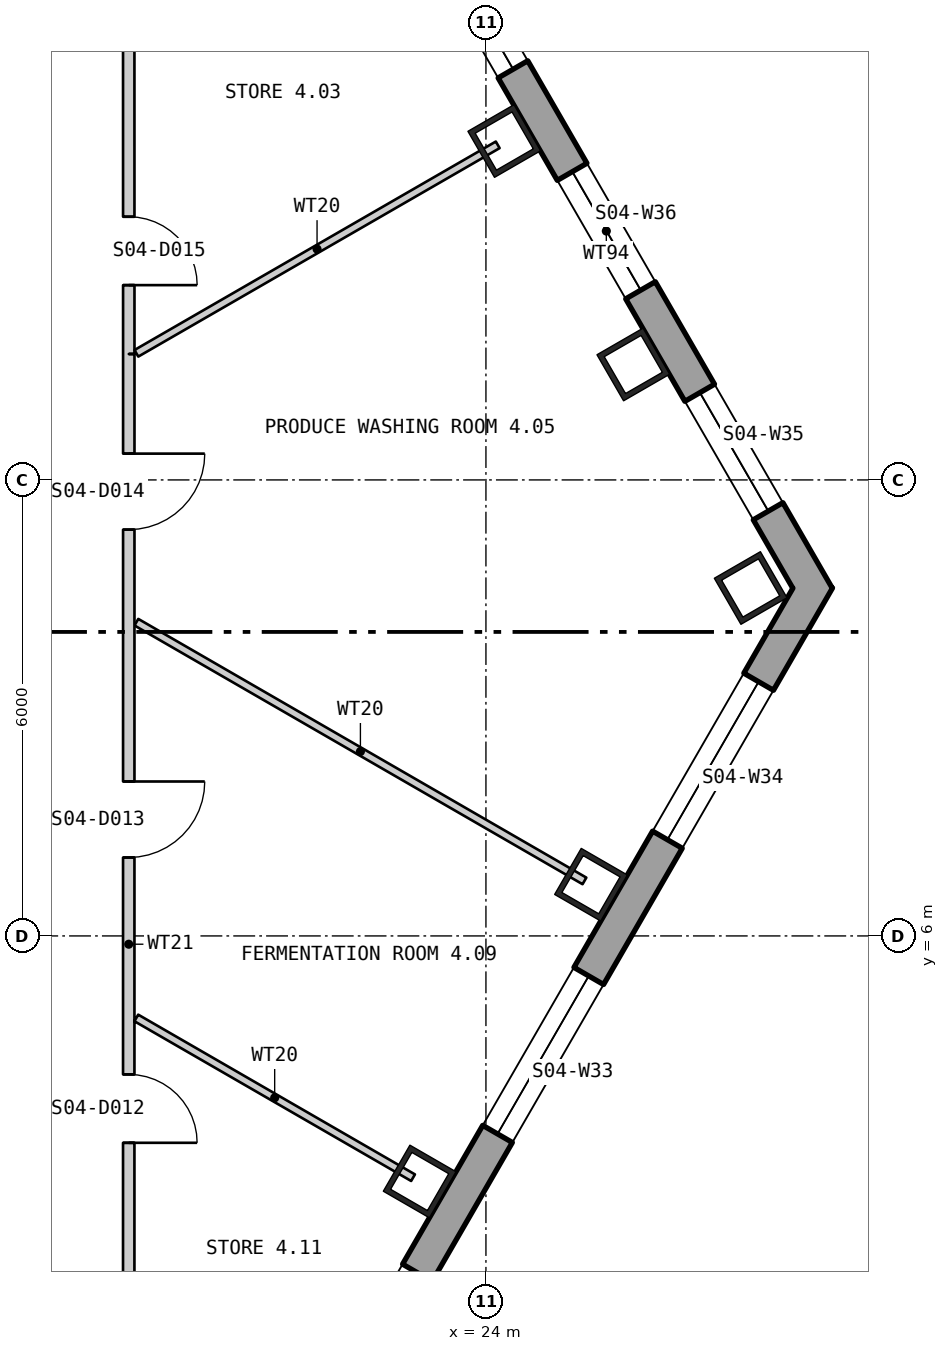
"""IFC4 building model, lengths in metres.
Left out: names, types, materials, properties, quantities, classifications, styles, units other than length and angle.
Written with IfcOpenShell. Run it as: python <this file> out.ifc"""

import sys

from ifc_helpers import new_model, si_unit, direction, frame, frame_2d, origin, origin_2d, place, context, subcontext, project, spatial, polyline, rectangle, hollow_rectangle, outline, extrude, element, fill, save


model = new_model("IFC4")
c1 = context("Model", 3, precision=1e-05, world=origin(), true_north=direction((0.0, 1.0)))
c2 = subcontext(c1, "Body", "Model", "MODEL_VIEW")
j1 = project(units=[si_unit("LENGTHUNIT", "METRE"), si_unit("PLANEANGLEUNIT", "RADIAN")], contexts=[c1])
p1 = place(None, origin())
s1 = spatial("IfcSite", under=j1, at=p1, CompositionType="ELEMENT")
p2 = place(p1, origin())
s2 = spatial("IfcBuilding", under=s1, at=p2, CompositionType="ELEMENT")
p3 = place(p2, frame((0.0, 0.0, 60.3)))
s3 = spatial("IfcBuildingStorey", under=s2, at=p3, CompositionType="ELEMENT", Elevation=60.3)
for number, where, z_axis, x_axis in (
    (1, (23.128, 2.769, 0.0), (0.0, 0.0, 1.0), (0.5, 0.866, 0.0)),
    (2, (25.382, 6.674, 0.0), (0.0, 0.0, 1.0), (0.5, 0.866, 0.0)),
    (3, (27.483, 10.578, 0.0), (0.0, 0.0, 1.0), (-0.5, 0.866, 0.0)),
    (4, (25.939, 13.519, 0.0), (0.0, 0.0, 1.0), (-0.5, 0.866, 0.0)),
    (5, (24.241, 16.459, 0.0), (0.0, 0.0, 1.0), (-0.5, 0.866, 0.0)),
):
    element("IfcColumn", number, at=place(p3, frame(where, z_axis=z_axis, x_axis=x_axis)), inside=s3, PredefinedType="COLUMN", context=c2, shape_type="SweptSolid", body=[
        extrude(hollow_rectangle(XDim=0.7, YDim=0.7, WallThickness=0.07, at=origin_2d()), origin(), (0.0, 0.0, 1.0), 4.5),
    ])
p4 = place(p3, frame((5.425, -29.042, -0.18), z_axis=(0.0, 0.0, 1.0), x_axis=(0.499999388847, 0.866025756634, 0.0)))
e6 = element("IfcWall", 6, at=p4, inside=s3, PredefinedType="SOLIDWALL", context=c2, shape_type="SweptSolid", body=[
    extrude(outline(polyline([(-0.13, -0.225), (45.88, -0.225), (45.62, 0.225), (0.13, 0.225), (-0.13, -0.225)])), origin(), (0.0, 0.0, 1.0), 4.28),
])
p5 = place(p4, frame((1.425, 0.0, 1.08)))
e7 = element("IfcOpeningElement", 7, at=p5, cuts=e6, PredefinedType="OPENING", context=c2, shape_type="SweptSolid", body=[
    extrude(rectangle(XDim=2.4, YDim=2.6, at=frame_2d((1.2, 1.3))), frame((0.0, 0.235, 0.0), z_axis=(0.0, -1.0, 0.0), x_axis=(1.0, 0.0, 0.0)), (0.0, 0.0, 1.0), 0.47),
])
p6 = place(p4, frame((5.895, 0.0, 1.08)))
e8 = element("IfcOpeningElement", 8, at=p6, cuts=e6, PredefinedType="OPENING", context=c2, shape_type="SweptSolid", body=[
    extrude(rectangle(XDim=2.4, YDim=2.6, at=frame_2d((1.2, 1.3))), frame((0.0, 0.235, 0.0), z_axis=(0.0, -1.0, 0.0), x_axis=(1.0, 0.0, 0.0)), (0.0, 0.0, 1.0), 0.47),
])
p7 = place(p4, frame((10.403, 0.0, 1.08)))
e9 = element("IfcOpeningElement", 9, at=p7, cuts=e6, PredefinedType="OPENING", context=c2, shape_type="SweptSolid", body=[
    extrude(rectangle(XDim=2.4, YDim=2.6, at=frame_2d((1.2, 1.3))), frame((0.0, 0.235, 0.0), z_axis=(0.0, -1.0, 0.0), x_axis=(1.0, 0.0, 0.0)), (0.0, 0.0, 1.0), 0.47),
])
p8 = place(p4, frame((14.912, 0.0, 1.08)))
e10 = element("IfcOpeningElement", 10, at=p8, cuts=e6, PredefinedType="OPENING", context=c2, shape_type="SweptSolid", body=[
    extrude(rectangle(XDim=2.4, YDim=2.6, at=frame_2d((1.2, 1.3))), frame((0.0, 0.235, 0.0), z_axis=(0.0, -1.0, 0.0), x_axis=(1.0, 0.0, 0.0)), (0.0, 0.0, 1.0), 0.47),
])
p9 = place(p4, frame((19.421, 0.0, 1.08)))
e11 = element("IfcOpeningElement", 11, at=p9, cuts=e6, PredefinedType="OPENING", context=c2, shape_type="SweptSolid", body=[
    extrude(rectangle(XDim=2.4, YDim=2.6, at=frame_2d((1.2, 1.3))), frame((0.0, 0.235, 0.0), z_axis=(0.0, -1.0, 0.0), x_axis=(1.0, 0.0, 0.0)), (0.0, 0.0, 1.0), 0.47),
])
p10 = place(p4, frame((23.929, 0.0, 1.08)))
e12 = element("IfcOpeningElement", 12, at=p10, cuts=e6, PredefinedType="OPENING", context=c2, shape_type="SweptSolid", body=[
    extrude(rectangle(XDim=2.4, YDim=2.6, at=frame_2d((1.2, 1.3))), frame((0.0, 0.235, 0.0), z_axis=(0.0, -1.0, 0.0), x_axis=(1.0, 0.0, 0.0)), (0.0, 0.0, 1.0), 0.47),
])
p11 = place(p4, frame((28.438, 0.0, 1.08)))
e13 = element("IfcOpeningElement", 13, at=p11, cuts=e6, PredefinedType="OPENING", context=c2, shape_type="SweptSolid", body=[
    extrude(rectangle(XDim=2.4, YDim=2.6, at=frame_2d((1.2, 1.3))), frame((0.0, 0.235, 0.0), z_axis=(0.0, -1.0, 0.0), x_axis=(1.0, 0.0, 0.0)), (0.0, 0.0, 1.0), 0.47),
])
p12 = place(p4, frame((32.947, 0.0, 1.08)))
e14 = element("IfcOpeningElement", 14, at=p12, cuts=e6, PredefinedType="OPENING", context=c2, shape_type="SweptSolid", body=[
    extrude(rectangle(XDim=2.4, YDim=2.6, at=frame_2d((1.2, 1.3))), frame((0.0, 0.235, 0.0), z_axis=(0.0, -1.0, 0.0), x_axis=(1.0, 0.0, 0.0)), (0.0, 0.0, 1.0), 0.47),
])
p13 = place(p4, frame((37.455, 0.0, 1.08)))
e15 = element("IfcOpeningElement", 15, at=p13, cuts=e6, PredefinedType="OPENING", context=c2, shape_type="SweptSolid", body=[
    extrude(rectangle(XDim=2.4, YDim=2.6, at=frame_2d((1.2, 1.3))), frame((0.0, 0.235, 0.0), z_axis=(0.0, -1.0, 0.0), x_axis=(1.0, 0.0, 0.0)), (0.0, 0.0, 1.0), 0.47),
])
p14 = place(p4, frame((41.925, 0.0, 1.08)))
e16 = element("IfcOpeningElement", 16, at=p14, cuts=e6, PredefinedType="OPENING", context=c2, shape_type="SweptSolid", body=[
    extrude(rectangle(XDim=2.4, YDim=2.6, at=frame_2d((1.2, 1.3))), frame((0.0, 0.235, 0.0), z_axis=(0.0, -1.0, 0.0), x_axis=(1.0, 0.0, 0.0)), (0.0, 0.0, 1.0), 0.47),
])
p15 = place(p3, frame((28.296, 10.576, -0.4), z_axis=(0.0, 0.0, 1.0), x_axis=(-0.500001948972, 0.866024278542, 0.0)))
e17 = element("IfcWall", 17, at=p15, inside=s3, PredefinedType="SOLIDWALL", context=c2, shape_type="SweptSolid", body=[
    extrude(outline(polyline([(-0.13, -0.225), (10.98, -0.225), (10.72, 0.225), (0.13, 0.225), (-0.13, -0.225)])), origin(), (0.0, 0.0, 1.0), 4.5),
])
p16 = place(p15, frame((1.168, 0.0, 1.3)))
e18 = element("IfcOpeningElement", 18, at=p16, cuts=e17, PredefinedType="OPENING", context=c2, shape_type="SweptSolid", body=[
    extrude(rectangle(XDim=1.8, YDim=2.6, at=frame_2d((0.9, 1.3))), frame((0.0, 0.235, 0.0), z_axis=(0.0, -1.0, 0.0), x_axis=(1.0, 0.0, 0.0)), (0.0, 0.0, 1.0), 0.47),
])
p17 = place(p15, frame((4.525, 0.0, 1.3)))
e19 = element("IfcOpeningElement", 19, at=p17, cuts=e17, PredefinedType="OPENING", context=c2, shape_type="SweptSolid", body=[
    extrude(rectangle(XDim=1.8, YDim=2.6, at=frame_2d((0.9, 1.3))), frame((0.0, 0.235, 0.0), z_axis=(0.0, -1.0, 0.0), x_axis=(1.0, 0.0, 0.0)), (0.0, 0.0, 1.0), 0.47),
])
p18 = place(p15, frame((7.882, 0.0, 1.3)))
e20 = element("IfcOpeningElement", 20, at=p18, cuts=e17, PredefinedType="OPENING", context=c2, shape_type="SweptSolid", body=[
    extrude(rectangle(XDim=1.8, YDim=2.6, at=frame_2d((0.9, 1.3))), frame((0.0, 0.235, 0.0), z_axis=(0.0, -1.0, 0.0), x_axis=(1.0, 0.0, 0.0)), (0.0, 0.0, 1.0), 0.47),
])
p19 = place(p3, frame((19.3, -1.875, 0.0), z_axis=(0.0, 0.0, 1.0), x_axis=(6.4383209e-05, 0.999999997927, 0.0)))
e21 = element("IfcWall", 21, at=p19, inside=s3, PredefinedType="PARTITIONING", context=c2, shape_type="SweptSolid", body=[
    extrude(rectangle(XDim=15.532, YDim=0.15, at=frame_2d((7.766, 0.0))), origin(), (0.0, 0.0, 1.0), 4.3),
])
p20 = place(p19, frame((5.153, 0.0, 0.0)))
e22 = element("IfcOpeningElement", 22, at=p20, cuts=e21, PredefinedType="OPENING", context=c2, shape_type="SweptSolid", body=[
    extrude(rectangle(XDim=0.9, YDim=2.1, at=frame_2d((0.45, 1.05))), frame((0.0, 0.085, 0.0), z_axis=(0.0, -1.0, 0.0), x_axis=(1.0, 0.0, 0.0)), (0.0, 0.0, 1.0), 0.17),
])
p21 = place(p19, frame((8.907, 0.0, 0.0)))
e23 = element("IfcOpeningElement", 23, at=p21, cuts=e21, PredefinedType="OPENING", context=c2, shape_type="SweptSolid", body=[
    extrude(rectangle(XDim=1.0, YDim=2.1, at=frame_2d((0.5, 1.05))), frame((0.0, 0.085, 0.0), z_axis=(0.0, -1.0, 0.0), x_axis=(1.0, 0.0, 0.0)), (0.0, 0.0, 1.0), 0.17),
])
p22 = place(p19, frame((13.221, 0.0, 0.0)))
e24 = element("IfcOpeningElement", 24, at=p22, cuts=e21, PredefinedType="OPENING", context=c2, shape_type="SweptSolid", body=[
    extrude(rectangle(XDim=1.0, YDim=2.1, at=frame_2d((0.5, 1.05))), frame((0.0, 0.085, 0.0), z_axis=(0.0, -1.0, 0.0), x_axis=(1.0, 0.0, 0.0)), (0.0, 0.0, 1.0), 0.17),
])
p23 = place(p3, frame((19.3, 19.749, 0.0), z_axis=(0.0, 0.0, 1.0), x_axis=(0.000164149702, -0.999999986527, 0.0)))
e25 = element("IfcWall", 25, at=p23, inside=s3, PredefinedType="PARTITIONING", context=c2, shape_type="SweptSolid", body=[
    extrude(rectangle(XDim=6.092, YDim=0.15, at=frame_2d((3.046, 0.0))), origin(), (0.0, 0.0, 1.0), 4.3),
])
p24 = place(p23, frame((4.286, 0.0, 0.0)))
e26 = element("IfcOpeningElement", 26, at=p24, cuts=e25, PredefinedType="OPENING", context=c2, shape_type="SweptSolid", body=[
    extrude(rectangle(XDim=0.9, YDim=2.1, at=frame_2d((0.45, 1.05))), frame((0.0, 0.085, 0.0), z_axis=(0.0, -1.0, 0.0), x_axis=(1.0, 0.0, 0.0)), (0.0, 0.0, 1.0), 0.17),
])
p25 = place(p3, frame((19.4, 4.921, 0.0), z_axis=(0.0, 0.0, 1.0), x_axis=(0.866039032844, -0.499976393034, 0.0)))
e27 = element("IfcWall", 27, at=p25, inside=s3, PredefinedType="PARTITIONING", context=c2, shape_type="SweptSolid", body=[
    extrude(rectangle(XDim=4.204, YDim=0.1, at=frame_2d((2.102, 0.0))), origin(), (0.0, 0.0, 1.0), 4.3),
])
p26 = place(p3, frame((19.401, 10.128, 0.0), z_axis=(0.0, 0.0, 1.0), x_axis=(0.865992313895, -0.50005730899, 0.0)))
e28 = element("IfcWall", 28, at=p26, inside=s3, PredefinedType="PARTITIONING", context=c2, shape_type="SweptSolid", body=[
    extrude(rectangle(XDim=6.807, YDim=0.1, at=frame_2d((3.404, 0.0))), origin(), (0.0, 0.0, 1.0), 4.3),
])
p27 = place(p3, frame((19.401, 13.666, 0.0), z_axis=(0.0, 0.0, 1.0), x_axis=(0.866161319146, 0.499764513761, 0.0)))
e29 = element("IfcWall", 29, at=p27, inside=s3, PredefinedType="PARTITIONING", context=c2, shape_type="SweptSolid", body=[
    extrude(rectangle(XDim=5.489, YDim=0.1, at=frame_2d((2.744, 0.0))), origin(), (0.0, 0.0, 1.0), 4.3),
])
p28 = place(p12, origin())
e30 = element("IfcWindow", 30, at=p28, inside=s3, PartitioningType="SINGLE_PANEL", PredefinedType="WINDOW", context=c2, shape_type="SweptSolid", body=[
    extrude(rectangle(XDim=2.4, YDim=2.6, at=frame_2d((1.2, 1.3))), frame((0.0, 0.105, 0.0), z_axis=(0.0, -1.0, 0.0), x_axis=(1.0, 0.0, 0.0)), (0.0, 0.0, 1.0), 0.06),
])
fill(e14, e30)
p29 = place(p13, origin())
e31 = element("IfcWindow", 31, at=p29, inside=s3, PartitioningType="SINGLE_PANEL", PredefinedType="WINDOW", context=c2, shape_type="SweptSolid", body=[
    extrude(rectangle(XDim=2.4, YDim=2.6, at=frame_2d((1.2, 1.3))), frame((0.0, 0.105, 0.0), z_axis=(0.0, -1.0, 0.0), x_axis=(1.0, 0.0, 0.0)), (0.0, 0.0, 1.0), 0.06),
])
fill(e15, e31)
p30 = place(p14, origin())
e32 = element("IfcWindow", 32, at=p30, inside=s3, PartitioningType="SINGLE_PANEL", PredefinedType="WINDOW", context=c2, shape_type="SweptSolid", body=[
    extrude(rectangle(XDim=2.4, YDim=2.6, at=frame_2d((1.2, 1.3))), frame((0.0, 0.105, 0.0), z_axis=(0.0, -1.0, 0.0), x_axis=(1.0, 0.0, 0.0)), (0.0, 0.0, 1.0), 0.06),
])
fill(e16, e32)
p31 = place(p16, origin())
e33 = element("IfcWindow", 33, at=p31, inside=s3, PartitioningType="SINGLE_PANEL", PredefinedType="WINDOW", context=c2, shape_type="SweptSolid", body=[
    extrude(rectangle(XDim=1.8, YDim=2.6, at=frame_2d((0.9, 1.3))), frame((0.0, 0.105, 0.0), z_axis=(0.0, -1.0, 0.0), x_axis=(1.0, 0.0, 0.0)), (0.0, 0.0, 1.0), 0.06),
])
fill(e18, e33)
p32 = place(p17, origin())
e34 = element("IfcWindow", 34, at=p32, inside=s3, PartitioningType="SINGLE_PANEL", PredefinedType="WINDOW", context=c2, shape_type="SweptSolid", body=[
    extrude(rectangle(XDim=1.8, YDim=2.6, at=frame_2d((0.9, 1.3))), frame((0.0, 0.105, 0.0), z_axis=(0.0, -1.0, 0.0), x_axis=(1.0, 0.0, 0.0)), (0.0, 0.0, 1.0), 0.06),
])
fill(e19, e34)
p33 = place(p18, origin())
e35 = element("IfcWindow", 35, at=p33, inside=s3, PartitioningType="SINGLE_PANEL", PredefinedType="WINDOW", context=c2, shape_type="SweptSolid", body=[
    extrude(rectangle(XDim=1.8, YDim=2.6, at=frame_2d((0.9, 1.3))), frame((0.0, 0.105, 0.0), z_axis=(0.0, -1.0, 0.0), x_axis=(1.0, 0.0, 0.0)), (0.0, 0.0, 1.0), 0.06),
])
fill(e20, e35)
p34 = place(p20, origin())
e36 = element("IfcDoor", 36, at=p34, inside=s3, OperationType="SINGLE_SWING_LEFT", PredefinedType="DOOR", context=c2, shape_type="SweptSolid", body=[
    extrude(rectangle(XDim=0.9, YDim=2.1, at=frame_2d((0.45, 1.05))), frame((0.0, 0.025, 0.0), z_axis=(0.0, -1.0, 0.0), x_axis=(1.0, 0.0, 0.0)), (0.0, 0.0, 1.0), 0.05),
])
fill(e22, e36)
p35 = place(p21, origin())
e37 = element("IfcDoor", 37, at=p35, inside=s3, OperationType="SINGLE_SWING_RIGHT", PredefinedType="DOOR", context=c2, shape_type="SweptSolid", body=[
    extrude(rectangle(XDim=1.0, YDim=2.1, at=frame_2d((0.5, 1.05))), frame((0.0, 0.025, 0.0), z_axis=(0.0, -1.0, 0.0), x_axis=(1.0, 0.0, 0.0)), (0.0, 0.0, 1.0), 0.05),
])
fill(e23, e37)
p36 = place(p22, origin())
e38 = element("IfcDoor", 38, at=p36, inside=s3, OperationType="SINGLE_SWING_RIGHT", PredefinedType="DOOR", context=c2, shape_type="SweptSolid", body=[
    extrude(rectangle(XDim=1.0, YDim=2.1, at=frame_2d((0.5, 1.05))), frame((0.0, 0.025, 0.0), z_axis=(0.0, -1.0, 0.0), x_axis=(1.0, 0.0, 0.0)), (0.0, 0.0, 1.0), 0.05),
])
fill(e24, e38)
p37 = place(p24, origin())
e39 = element("IfcDoor", 39, at=p37, inside=s3, OperationType="SINGLE_SWING_LEFT", PredefinedType="DOOR", context=c2, shape_type="SweptSolid", body=[
    extrude(rectangle(XDim=0.9, YDim=2.1, at=frame_2d((0.45, 1.05))), frame((0.0, 0.025, 0.0), z_axis=(0.0, -1.0, 0.0), x_axis=(1.0, 0.0, 0.0)), (0.0, 0.0, 1.0), 0.05),
])
fill(e26, e39)
save(model, sys.argv[1])
